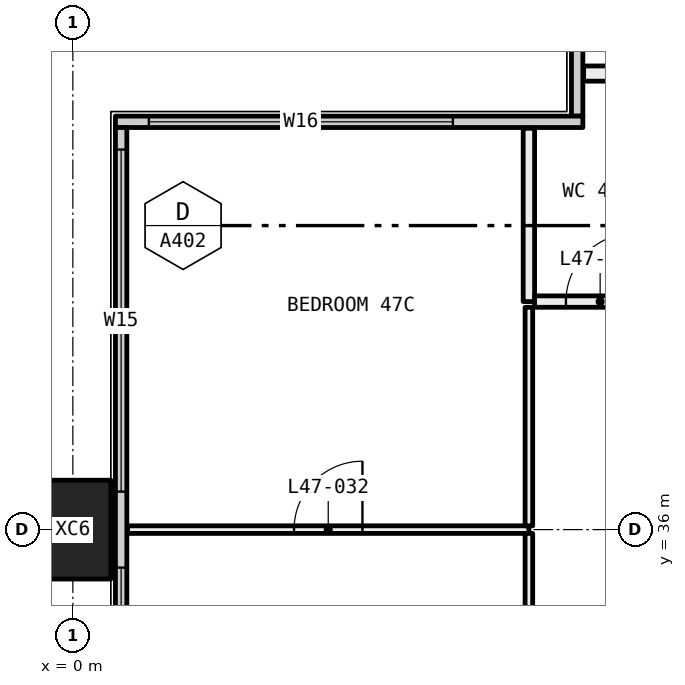
"""IFC4 building model, lengths in metres.
Left out: names, types, materials, properties, quantities, classifications, styles, units other than length and angle.
Written with IfcOpenShell. Run it as: python <this file> out.ifc"""

import sys

from ifc_helpers import new_model, si_unit, direction, frame, frame_2d, origin, origin_2d, place, context, subcontext, project, spatial, rectangle, hollow_rectangle, extrude, element, fill, save


model = new_model("IFC4")
c1 = context("Model", 3, precision=1e-05, world=origin(), true_north=direction((0.0, 1.0)))
c2 = subcontext(c1, "Body", "Model", "MODEL_VIEW")
j1 = project(units=[si_unit("LENGTHUNIT", "METRE"), si_unit("PLANEANGLEUNIT", "RADIAN")], contexts=[c1])
p1 = place(None, origin())
s1 = spatial("IfcSite", under=j1, at=p1, CompositionType="ELEMENT")
p2 = place(p1, origin())
s2 = spatial("IfcBuilding", under=s1, at=p2, CompositionType="ELEMENT")
p3 = place(p2, frame((0.0, 0.0, 178.95)))
s3 = spatial("IfcBuildingStorey", under=s2, at=p3, CompositionType="ELEMENT", Elevation=178.95)
p4 = place(p3, frame((0.0, 36.0, -0.4), z_axis=(0.0, 0.0, 1.0), x_axis=(0.0, 1.0, 0.0)))
e1 = element("IfcColumn", 1, at=p4, inside=s3, PredefinedType="COLUMN", context=c2, shape_type="SweptSolid", body=[
    extrude(hollow_rectangle(XDim=1.3, YDim=1.0, WallThickness=0.05, at=origin_2d()), origin(), (0.0, 0.0, 1.0), 3.45),
])
p5 = place(p3, frame((6.635, 41.44, 0.0), z_axis=(0.0, 0.0, 1.0), x_axis=(0.0, 1.0, 0.0)))
e2 = element("IfcWall", 2, at=p5, inside=s3, PredefinedType="ELEMENTEDWALL", context=c2, shape_type="SweptSolid", body=[
    extrude(rectangle(XDim=5.85, YDim=0.15, at=frame_2d((2.925, 0.0))), origin(), (0.0, 0.0, 1.0), 3.05),
])
p6 = place(p5, frame((1.56, 0.0, 0.45)))
e3 = element("IfcOpeningElement", 3, at=p6, cuts=e2, PredefinedType="OPENING", context=c2, shape_type="SweptSolid", body=[
    extrude(rectangle(XDim=4.0, YDim=2.55, at=frame_2d((2.0, 1.275))), frame((0.0, 0.085, 0.0), z_axis=(0.0, -1.0, 0.0), x_axis=(1.0, 0.0, 0.0)), (0.0, 0.0, 1.0), 0.17),
])
p7 = place(p3, frame((0.56, 41.365, 0.0), z_axis=(0.0, 0.0, 1.0), x_axis=(1.0, 0.0, 0.0)))
e4 = element("IfcWall", 4, at=p7, inside=s3, PredefinedType="ELEMENTEDWALL", context=c2, shape_type="SweptSolid", body=[
    extrude(rectangle(XDim=6.15, YDim=0.15, at=frame_2d((3.075, 0.0))), origin(), (0.0, 0.0, 1.0), 3.05),
])
p8 = place(p7, frame((0.44, 0.0, 0.45)))
e5 = element("IfcOpeningElement", 5, at=p8, cuts=e4, PredefinedType="OPENING", context=c2, shape_type="SweptSolid", body=[
    extrude(rectangle(XDim=4.0, YDim=2.55, at=frame_2d((2.0, 1.275))), frame((0.0, 0.085, 0.0), z_axis=(0.0, -1.0, 0.0), x_axis=(1.0, 0.0, 0.0)), (0.0, 0.0, 1.0), 0.17),
])
p9 = place(p3, frame((0.635, 18.71, 0.0), z_axis=(0.0, 0.0, 1.0), x_axis=(0.0, 1.0, 0.0)))
e6 = element("IfcWall", 6, at=p9, inside=s3, PredefinedType="ELEMENTEDWALL", context=c2, shape_type="SweptSolid", body=[
    extrude(rectangle(XDim=22.58, YDim=0.15, at=frame_2d((11.29, 0.0))), origin(), (0.0, 0.0, 1.0), 3.05),
])
p10 = place(p9, frame((0.29, 0.0, 0.45)))
e7 = element("IfcOpeningElement", 7, at=p10, cuts=e6, PredefinedType="OPENING", context=c2, shape_type="SweptSolid", body=[
    extrude(rectangle(XDim=4.5, YDim=2.55, at=frame_2d((2.25, 1.275))), frame((0.0, 0.085, 0.0), z_axis=(0.0, -1.0, 0.0), x_axis=(1.0, 0.0, 0.0)), (0.0, 0.0, 1.0), 0.17),
])
p11 = place(p9, frame((5.79, 0.0, 0.45)))
e8 = element("IfcOpeningElement", 8, at=p11, cuts=e6, PredefinedType="OPENING", context=c2, shape_type="SweptSolid", body=[
    extrude(rectangle(XDim=1.75, YDim=2.55, at=frame_2d((0.875, 1.275))), frame((0.0, 0.085, 0.0), z_axis=(0.0, -1.0, 0.0), x_axis=(1.0, 0.0, 0.0)), (0.0, 0.0, 1.0), 0.17),
])
p12 = place(p9, frame((15.04, 0.0, 0.45)))
e9 = element("IfcOpeningElement", 9, at=p12, cuts=e6, PredefinedType="OPENING", context=c2, shape_type="SweptSolid", body=[
    extrude(rectangle(XDim=1.75, YDim=2.55, at=frame_2d((0.875, 1.275))), frame((0.0, 0.085, 0.0), z_axis=(0.0, -1.0, 0.0), x_axis=(1.0, 0.0, 0.0)), (0.0, 0.0, 1.0), 0.17),
])
p13 = place(p9, frame((17.79, 0.0, 0.45)))
e10 = element("IfcOpeningElement", 10, at=p13, cuts=e6, PredefinedType="OPENING", context=c2, shape_type="SweptSolid", body=[
    extrude(rectangle(XDim=4.5, YDim=2.55, at=frame_2d((2.25, 1.275))), frame((0.0, 0.085, 0.0), z_axis=(0.0, -1.0, 0.0), x_axis=(1.0, 0.0, 0.0)), (0.0, 0.0, 1.0), 0.17),
])
p14 = place(p3, frame((6.72, 42.0, 0.0), z_axis=(0.0, 0.0, 1.0), x_axis=(1.0, 0.0, 0.0)))
e11 = element("IfcWall", 11, at=p14, inside=s3, PredefinedType="PARTITIONING", context=c2, shape_type="SweptSolid", body=[
    extrude(rectangle(XDim=1.08, YDim=0.2, at=frame_2d((0.54, 0.0))), origin(), (0.0, 0.0, 1.0), 3.05),
])
p15 = place(p3, frame((6.0, 36.0, 0.0), z_axis=(0.0, 0.0, 1.0), x_axis=(-1.0, 0.0, 0.0)))
e12 = element("IfcWall", 12, at=p15, inside=s3, PredefinedType="PARTITIONING", context=c2, shape_type="SweptSolid", body=[
    extrude(rectangle(XDim=5.28, YDim=0.1, at=frame_2d((2.64, 0.0))), origin(), (0.0, 0.0, 1.0), 2.45),
])
p16 = place(p15, frame((2.19, 0.0, 0.0)))
e13 = element("IfcOpeningElement", 13, at=p16, cuts=e12, PredefinedType="OPENING", context=c2, shape_type="SweptSolid", body=[
    extrude(rectangle(XDim=0.9, YDim=2.1, at=frame_2d((0.45, 1.05))), frame((0.0, 0.06, 0.0), z_axis=(0.0, -1.0, 0.0), x_axis=(1.0, 0.0, 0.0)), (0.0, 0.0, 1.0), 0.12),
])
p17 = place(p3, frame((6.0, 25.5, 0.0), z_axis=(0.0, 0.0, 1.0), x_axis=(0.0, 1.0, 0.0)))
e14 = element("IfcWall", 14, at=p17, inside=s3, PredefinedType="PARTITIONING", context=c2, shape_type="SweptSolid", body=[
    extrude(rectangle(XDim=10.45, YDim=0.1, at=frame_2d((5.225, 0.0))), origin(), (0.0, 0.0, 1.0), 2.45),
])
p18 = place(p3, frame((6.0, 36.05, 0.0), z_axis=(0.0, 0.0, 1.0), x_axis=(0.0, 1.0, 0.0)))
e15 = element("IfcWall", 15, at=p18, inside=s3, PredefinedType="PARTITIONING", context=c2, shape_type="SweptSolid", body=[
    extrude(rectangle(XDim=2.875, YDim=0.1, at=frame_2d((1.438, 0.0))), origin(), (0.0, 0.0, 1.0), 2.45),
])
p19 = place(p3, frame((6.0, 39.0, 0.0), z_axis=(0.0, 0.0, 1.0), x_axis=(0.0, 1.0, 0.0)))
e16 = element("IfcWall", 16, at=p19, inside=s3, PredefinedType="PARTITIONING", context=c2, shape_type="SweptSolid", body=[
    extrude(rectangle(XDim=2.28, YDim=0.15, at=frame_2d((1.14, 0.0))), origin(), (0.0, 0.0, 1.0), 3.05),
])
p20 = place(p3, frame((7.8, 39.0, 0.0), z_axis=(0.0, 0.0, 1.0), x_axis=(-1.0, 0.0, 0.0)))
e17 = element("IfcWall", 17, at=p20, inside=s3, PredefinedType="PARTITIONING", context=c2, shape_type="SweptSolid", body=[
    extrude(rectangle(XDim=1.725, YDim=0.15, at=frame_2d((0.863, 0.0))), origin(), (0.0, 0.0, 1.0), 3.05),
])
p21 = place(p20, frame((0.413, 0.0, 0.0)))
e18 = element("IfcOpeningElement", 18, at=p21, cuts=e17, PredefinedType="OPENING", context=c2, shape_type="SweptSolid", body=[
    extrude(rectangle(XDim=0.9, YDim=2.1, at=frame_2d((0.45, 1.05))), frame((0.0, 0.085, 0.0), z_axis=(0.0, -1.0, 0.0), x_axis=(1.0, 0.0, 0.0)), (0.0, 0.0, 1.0), 0.17),
])
p22 = place(p8, origin())
e19 = element("IfcWindow", 19, at=p22, inside=s3, PartitioningType="SINGLE_PANEL", PredefinedType="WINDOW", context=c2, shape_type="SweptSolid", body=[
    extrude(rectangle(XDim=4.0, YDim=2.55, at=frame_2d((2.0, 1.275))), frame((0.0, 0.03, 0.0), z_axis=(0.0, -1.0, 0.0), x_axis=(1.0, 0.0, 0.0)), (0.0, 0.0, 1.0), 0.06),
])
fill(e5, e19)
p23 = place(p12, origin())
e20 = element("IfcWindow", 20, at=p23, inside=s3, PartitioningType="SINGLE_PANEL", PredefinedType="WINDOW", context=c2, shape_type="SweptSolid", body=[
    extrude(rectangle(XDim=1.75, YDim=2.55, at=frame_2d((0.875, 1.275))), frame((0.0, 0.03, 0.0), z_axis=(0.0, -1.0, 0.0), x_axis=(1.0, 0.0, 0.0)), (0.0, 0.0, 1.0), 0.06),
])
fill(e9, e20)
p24 = place(p13, origin())
e21 = element("IfcWindow", 21, at=p24, inside=s3, PartitioningType="SINGLE_PANEL", PredefinedType="WINDOW", context=c2, shape_type="SweptSolid", body=[
    extrude(rectangle(XDim=4.5, YDim=2.55, at=frame_2d((2.25, 1.275))), frame((0.0, 0.03, 0.0), z_axis=(0.0, -1.0, 0.0), x_axis=(1.0, 0.0, 0.0)), (0.0, 0.0, 1.0), 0.06),
])
fill(e10, e21)
p25 = place(p16, frame((0.9, 0.0, 0.0), x_axis=(-1.0, 0.0, 0.0)))
e22 = element("IfcDoor", 22, at=p25, inside=s3, OperationType="SINGLE_SWING_LEFT", PredefinedType="DOOR", context=c2, shape_type="SweptSolid", body=[
    extrude(rectangle(XDim=0.9, YDim=2.1, at=frame_2d((0.45, 1.05))), frame((0.0, 0.025, 0.0), z_axis=(0.0, -1.0, 0.0), x_axis=(1.0, 0.0, 0.0)), (0.0, 0.0, 1.0), 0.05),
])
fill(e13, e22)
p26 = place(p21, frame((0.9, 0.0, 0.0), x_axis=(-1.0, 0.0, 0.0)))
e23 = element("IfcDoor", 23, at=p26, inside=s3, OperationType="SINGLE_SWING_LEFT", PredefinedType="DOOR", context=c2, shape_type="SweptSolid", body=[
    extrude(rectangle(XDim=0.9, YDim=2.1, at=frame_2d((0.45, 1.05))), frame((0.0, 0.025, 0.0), z_axis=(0.0, -1.0, 0.0), x_axis=(1.0, 0.0, 0.0)), (0.0, 0.0, 1.0), 0.05),
])
fill(e18, e23)
save(model, sys.argv[1])
